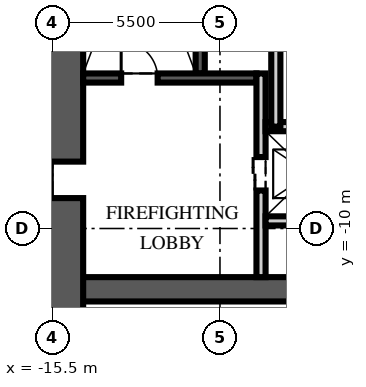
"""IFC4 building model, lengths in metres.
Left out: names, types, materials, properties, quantities, classifications, styles, units other than length and angle.
Written with IfcOpenShell. Run it as: python <this file> out.ifc"""

import sys

from ifc_helpers import new_model, si_unit, direction, frame, frame_2d, origin, place, context, subcontext, project, spatial, rectangle, extrude, element, fill, save


model = new_model("IFC4")
c1 = context("Model", 3, precision=1e-05, world=origin(), true_north=direction((0.0, 1.0)))
c2 = subcontext(c1, "Body", "Model", "MODEL_VIEW")
j1 = project(units=[si_unit("LENGTHUNIT", "METRE"), si_unit("PLANEANGLEUNIT", "RADIAN")], contexts=[c1])
p1 = place(None, origin())
s1 = spatial("IfcSite", under=j1, at=p1, CompositionType="ELEMENT")
p2 = place(p1, origin())
s2 = spatial("IfcBuilding", under=s1, at=p2, CompositionType="ELEMENT")
p3 = place(p2, frame((0.0, 0.0, -9.0)))
s3 = spatial("IfcBuildingStorey", under=s2, at=p3, CompositionType="ELEMENT", Elevation=-9.0)
p4 = place(p3, frame((-15.5, -12.0, -0.3), z_axis=(0.0, 0.0, 1.0), x_axis=(1.0, 0.0, 0.0)))
e1 = element("IfcWall", 1, at=p4, inside=s3, PredefinedType="SHEAR", context=c2, shape_type="SweptSolid", body=[
    extrude(rectangle(XDim=31.0, YDim=0.8, at=frame_2d((15.5, 0.0))), origin(), (0.0, 0.0, 1.0), 3.6),
])
p5 = place(p3, frame((-15.5, -15.5, -0.3), z_axis=(0.0, 0.0, 1.0), x_axis=(0.0, 1.0, 0.0)))
e2 = element("IfcWall", 2, at=p5, inside=s3, PredefinedType="SHEAR", context=c2, shape_type="SweptSolid", body=[
    extrude(rectangle(XDim=31.0, YDim=2.0, at=frame_2d((15.5, 0.0))), origin(), (0.0, 0.0, 1.0), 3.6),
])
p6 = place(p5, frame((6.5, 0.0, 0.3)))
e3 = element("IfcOpeningElement", 3, at=p6, cuts=e2, PredefinedType="OPENING", context=c2, shape_type="SweptSolid", body=[
    extrude(rectangle(XDim=1.2, YDim=2.1, at=frame_2d((0.6, 1.05))), frame((0.0, 1.01, 0.0), z_axis=(0.0, -1.0, 0.0), x_axis=(1.0, 0.0, 0.0)), (0.0, 0.0, 1.0), 2.02),
])
p7 = place(p5, frame((23.0, 0.0, 0.3)))
e4 = element("IfcOpeningElement", 4, at=p7, cuts=e2, PredefinedType="OPENING", context=c2, shape_type="SweptSolid", body=[
    extrude(rectangle(XDim=1.8, YDim=2.1, at=frame_2d((0.9, 1.05))), frame((0.0, 1.01, 0.0), z_axis=(0.0, -1.0, 0.0), x_axis=(1.0, 0.0, 0.0)), (0.0, 0.0, 1.0), 2.02),
])
p8 = place(p3, frame((-10.65, -4.9, 0.0), z_axis=(0.0, 0.0, 1.0), x_axis=(0.0, 1.0, 0.0)))
e5 = element("IfcWall", 5, at=p8, inside=s3, PredefinedType="SOLIDWALL", context=c2, shape_type="SweptSolid", body=[
    extrude(rectangle(XDim=10.1, YDim=0.3, at=frame_2d((5.05, 0.0))), origin(), (0.0, 0.0, 1.0), 3.3),
])
p9 = place(p3, frame((-14.5, -5.05, 0.0), z_axis=(0.0, 0.0, 1.0), x_axis=(1.0, 0.0, 0.0)))
e6 = element("IfcWall", 6, at=p9, inside=s3, PredefinedType="SOLIDWALL", context=c2, shape_type="SweptSolid", body=[
    extrude(rectangle(XDim=5.7, YDim=0.3, at=frame_2d((2.85, 0.0))), origin(), (0.0, 0.0, 1.0), 3.3),
])
p10 = place(p9, frame((1.25, 0.0, 0.0)))
e7 = element("IfcOpeningElement", 7, at=p10, cuts=e6, PredefinedType="OPENING", context=c2, shape_type="SweptSolid", body=[
    extrude(rectangle(XDim=1.2, YDim=2.1, at=frame_2d((0.6, 1.05))), frame((0.0, 0.16, 0.0), z_axis=(0.0, -1.0, 0.0), x_axis=(1.0, 0.0, 0.0)), (0.0, 0.0, 1.0), 0.32),
])
p11 = place(p3, frame((-8.65, -11.6, 0.0), z_axis=(0.0, 0.0, 1.0), x_axis=(0.0, 1.0, 0.0)))
e8 = element("IfcWall", 8, at=p11, inside=s3, PredefinedType="PARTITIONING", context=c2, shape_type="SweptSolid", body=[
    extrude(rectangle(XDim=6.7, YDim=0.3, at=frame_2d((3.35, 0.0))), origin(), (0.0, 0.0, 1.0), 3.3),
])
p12 = place(p11, frame((2.85, 0.0, 0.0)))
e9 = element("IfcOpeningElement", 9, at=p12, cuts=e8, PredefinedType="OPENING", context=c2, shape_type="SweptSolid", body=[
    extrude(rectangle(XDim=1.1, YDim=2.1, at=frame_2d((0.55, 1.05))), frame((0.0, 0.16, 0.0), z_axis=(0.0, -1.0, 0.0), x_axis=(1.0, 0.0, 0.0)), (0.0, 0.0, 1.0), 0.32),
])
p13 = place(p3, frame((-8.5, -6.65, 0.0), z_axis=(0.0, 0.0, 1.0), x_axis=(1.0, 0.0, 0.0)))
e10 = element("IfcWall", 10, at=p13, inside=s3, PredefinedType="PARTITIONING", context=c2, shape_type="SweptSolid", body=[
    extrude(rectangle(XDim=17.0, YDim=0.3, at=frame_2d((8.5, 0.0))), origin(), (0.0, 0.0, 1.0), 3.3),
])
p14 = place(p13, frame((7.8, 0.0, 0.0)))
e11 = element("IfcOpeningElement", 11, at=p14, cuts=e10, PredefinedType="OPENING", context=c2, shape_type="SweptSolid", body=[
    extrude(rectangle(XDim=1.3, YDim=2.4, at=frame_2d((0.65, 1.2))), frame((0.0, 0.16, 0.0), z_axis=(0.0, -1.0, 0.0), x_axis=(1.0, 0.0, 0.0)), (0.0, 0.0, 1.0), 0.32),
])
p15 = place(p13, frame((5.65, 0.0, 0.0)))
e12 = element("IfcOpeningElement", 12, at=p15, cuts=e10, PredefinedType="OPENING", context=c2, shape_type="SweptSolid", body=[
    extrude(rectangle(XDim=0.9, YDim=2.1, at=frame_2d((0.45, 1.05))), frame((0.0, 0.16, 0.0), z_axis=(0.0, -1.0, 0.0), x_axis=(1.0, 0.0, 0.0)), (0.0, 0.0, 1.0), 0.32),
])
p16 = place(p13, frame((10.4, 0.0, 0.0)))
e13 = element("IfcOpeningElement", 13, at=p16, cuts=e10, PredefinedType="OPENING", context=c2, shape_type="SweptSolid", body=[
    extrude(rectangle(XDim=0.9, YDim=2.1, at=frame_2d((0.45, 1.05))), frame((0.0, 0.16, 0.0), z_axis=(0.0, -1.0, 0.0), x_axis=(1.0, 0.0, 0.0)), (0.0, 0.0, 1.0), 0.32),
])
p17 = place(p3, frame((-8.5, -9.75, 0.0), z_axis=(0.0, 0.0, 1.0), x_axis=(1.0, 0.0, 0.0)))
e14 = element("IfcWall", 14, at=p17, inside=s3, PredefinedType="PARTITIONING", context=c2, shape_type="SweptSolid", body=[
    extrude(rectangle(XDim=2.9, YDim=0.3, at=frame_2d((1.45, 0.0))), origin(), (0.0, 0.0, 1.0), 3.3),
])
p18 = place(p3, frame((-8.163, -6.65, 0.0), z_axis=(0.0, 0.0, 1.0), x_axis=(0.0, 1.0, 0.0)))
e15 = element("IfcWall", 15, at=p18, inside=s3, PredefinedType="PARTITIONING", context=c2, shape_type="SweptSolid", body=[
    extrude(rectangle(XDim=7.45, YDim=0.3, at=frame_2d((3.725, 0.0))), origin(), (0.0, 0.0, 1.0), 3.3),
])
p19 = place(p10, origin())
e16 = element("IfcDoor", 16, at=p19, inside=s3, OperationType="SINGLE_SWING_LEFT", PredefinedType="DOOR", context=c2, shape_type="SweptSolid", body=[
    extrude(rectangle(XDim=1.2, YDim=2.1, at=frame_2d((0.6, 1.05))), frame((0.0, 0.025, 0.0), z_axis=(0.0, -1.0, 0.0), x_axis=(1.0, 0.0, 0.0)), (0.0, 0.0, 1.0), 0.05),
])
fill(e7, e16)
p20 = place(p6, origin())
e17 = element("IfcDoor", 17, at=p20, inside=s3, OperationType="SINGLE_SWING_LEFT", PredefinedType="DOOR", context=c2, shape_type="SweptSolid", body=[
    extrude(rectangle(XDim=1.2, YDim=2.1, at=frame_2d((0.6, 1.05))), frame((0.0, 0.025, 0.0), z_axis=(0.0, -1.0, 0.0), x_axis=(1.0, 0.0, 0.0)), (0.0, 0.0, 1.0), 0.05),
])
fill(e3, e17)
p21 = place(p12, origin())
e18 = element("IfcDoor", 18, at=p21, inside=s3, OperationType="DOUBLE_DOOR_SLIDING", PredefinedType="DOOR", context=c2, shape_type="SweptSolid", body=[
    extrude(rectangle(XDim=1.1, YDim=2.1, at=frame_2d((0.55, 1.05))), frame((0.0, 0.025, 0.0), z_axis=(0.0, -1.0, 0.0), x_axis=(1.0, 0.0, 0.0)), (0.0, 0.0, 1.0), 0.05),
])
fill(e9, e18)
save(model, sys.argv[1])
